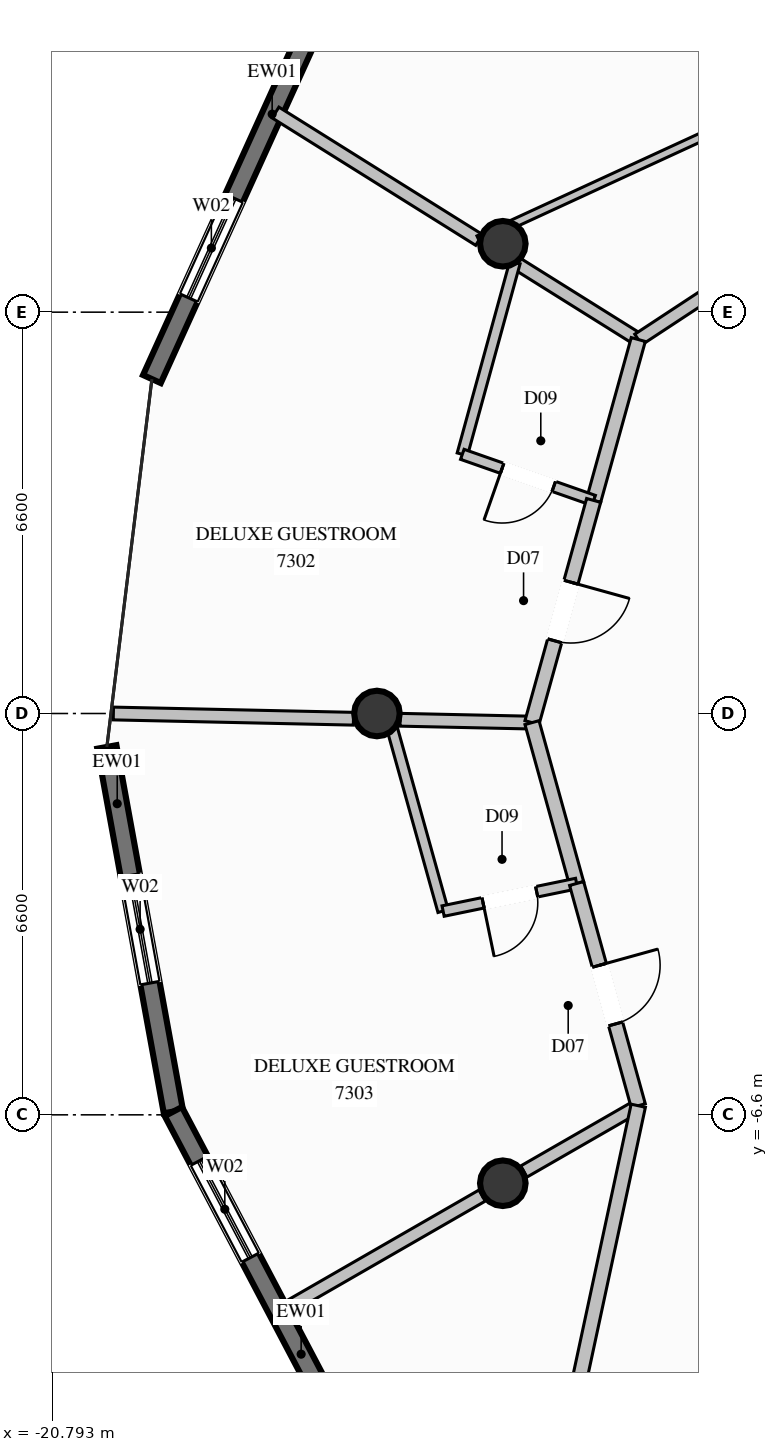
"""IFC4 building model, lengths in metres.
Left out: names, types, materials, properties, quantities, classifications, styles, units other than length and angle.
Written with IfcOpenShell. Run it as: python <this file> out.ifc"""

import sys

from ifc_helpers import new_model, si_unit, direction, frame, frame_2d, origin, origin_2d, place, context, subcontext, project, spatial, rectangle, circle, extrude, element, fill, save


model = new_model("IFC4")
c1 = context("Model", 3, precision=1e-05, world=origin(), true_north=direction((0.0, 1.0)))
c2 = subcontext(c1, "Body", "Model", "MODEL_VIEW")
j1 = project(units=[si_unit("LENGTHUNIT", "METRE"), si_unit("PLANEANGLEUNIT", "RADIAN")], contexts=[c1])
p1 = place(None, origin())
s1 = spatial("IfcSite", under=j1, at=p1, CompositionType="ELEMENT")
p2 = place(p1, origin())
s2 = spatial("IfcBuilding", under=s1, at=p2, CompositionType="ELEMENT")
p3 = place(p2, frame((0.0, 0.0, 274.4)))
s3 = spatial("IfcBuildingStorey", under=s2, at=p3, CompositionType="ELEMENT", Elevation=274.4)
for number, where, z_axis, x_axis in (
    (1, (-13.38, 7.725, 0.0), (0.0, 0.0, 1.0), (1.0, 0.0, 0.0)),
    (2, (-15.45, 0.0, 0.0), (0.0, 0.0, 1.0), (1.0, 0.0, 0.0)),
    (3, (-13.38, -7.725, 0.0), (0.0, 0.0, 1.0), (1.0, 0.0, 0.0)),
):
    element("IfcColumn", number, at=place(p3, frame(where, z_axis=z_axis, x_axis=x_axis)), inside=s3, PredefinedType="COLUMN", context=c2, shape_type="SweptSolid", body=[
        extrude(circle(Radius=0.375, at=origin_2d()), origin(), (0.0, 0.0, 1.0), 3.8),
    ])
p4 = place(p3, frame((-19.151, 5.5, 0.0), z_axis=(0.0, 0.0, 1.0), x_axis=(0.413325805639, 0.910583207836, 0.0)))
e4 = element("IfcWall", 4, at=p4, inside=s3, PredefinedType="SOLIDWALL", context=c2, shape_type="SweptSolid", body=[
    extrude(rectangle(XDim=6.053, YDim=0.32, at=frame_2d((3.027, 0.0))), origin(), (0.0, 0.0, 1.0), 3.57),
])
p5 = place(p4, frame((1.466, 0.0, 0.35)))
e5 = element("IfcOpeningElement", 5, at=p5, cuts=e4, PredefinedType="OPENING", context=c2, shape_type="SweptSolid", body=[
    extrude(rectangle(XDim=1.8, YDim=2.6, at=frame_2d((0.9, 1.3))), frame((0.0, 0.17, 0.0), z_axis=(0.0, -1.0, 0.0), x_axis=(1.0, 0.0, 0.0)), (0.0, 0.0, 1.0), 0.34),
])
p6 = place(p3, frame((-18.798, -6.546, 0.0), z_axis=(0.0, 0.0, 1.0), x_axis=(-0.179495230974, 0.983758843446, 0.0)))
e6 = element("IfcWall", 6, at=p6, inside=s3, PredefinedType="SOLIDWALL", context=c2, shape_type="SweptSolid", body=[
    extrude(rectangle(XDim=6.095, YDim=0.32, at=frame_2d((3.047, 0.0))), origin(), (0.0, 0.0, 1.0), 3.57),
])
p7 = place(p6, frame((2.147, 0.0, 0.35)))
e7 = element("IfcOpeningElement", 7, at=p7, cuts=e6, PredefinedType="OPENING", context=c2, shape_type="SweptSolid", body=[
    extrude(rectangle(XDim=1.8, YDim=2.6, at=frame_2d((0.9, 1.3))), frame((0.0, 0.17, 0.0), z_axis=(0.0, -1.0, 0.0), x_axis=(1.0, 0.0, 0.0)), (0.0, 0.0, 1.0), 0.34),
])
p8 = place(p3, frame((-15.977, -11.902, 0.0), z_axis=(0.0, 0.0, 1.0), x_axis=(-0.466004047649, 0.884782587744, 0.0)))
e8 = element("IfcWall", 8, at=p8, inside=s3, PredefinedType="SOLIDWALL", context=c2, shape_type="SweptSolid", body=[
    extrude(rectangle(XDim=6.054, YDim=0.32, at=frame_2d((3.027, 0.0))), origin(), (0.0, 0.0, 1.0), 3.57),
])
p9 = place(p8, frame((3.338, 0.0, 0.35)))
e9 = element("IfcOpeningElement", 9, at=p9, cuts=e8, PredefinedType="OPENING", context=c2, shape_type="SweptSolid", body=[
    extrude(rectangle(XDim=1.8, YDim=2.6, at=frame_2d((0.9, 1.3))), frame((0.0, 0.17, 0.0), z_axis=(0.0, -1.0, 0.0), x_axis=(1.0, 0.0, 0.0)), (0.0, 0.0, 1.0), 0.34),
])
p10 = place(p3, frame((-11.152, 6.15, 0.0), z_axis=(0.0, 0.0, 1.0), x_axis=(-0.847696016943, 0.530482292692, 0.0)))
e10 = element("IfcWall", 10, at=p10, inside=s3, PredefinedType="PARTITIONING", context=c2, shape_type="SweptSolid", body=[
    extrude(rectangle(XDim=2.361, YDim=0.21, at=frame_2d((1.18, 0.0))), origin(), (0.0, 0.0, 1.0), 3.086),
])
p11 = place(p3, frame((-13.77, 7.788, 0.0), z_axis=(0.0, 0.0, 1.0), x_axis=(-0.84770992622, 0.530460065404, 0.0)))
e11 = element("IfcWall", 11, at=p11, inside=s3, PredefinedType="PARTITIONING", context=c2, shape_type="SweptSolid", body=[
    extrude(rectangle(XDim=3.949, YDim=0.21, at=frame_2d((1.975, 0.0))), origin(), (0.0, 0.0, 1.0), 3.57),
])
p12 = place(p3, frame((-12.9, -0.15, 0.0), z_axis=(0.0, 0.0, 1.0), x_axis=(-0.999766597487, 0.021604410435, 0.0)))
e12 = element("IfcWall", 12, at=p12, inside=s3, PredefinedType="PARTITIONING", context=c2, shape_type="SweptSolid", body=[
    extrude(rectangle(XDim=2.17, YDim=0.21, at=frame_2d((1.085, 0.0))), origin(), (0.0, 0.0, 1.0), 3.57),
])
p13 = place(p3, frame((-15.836, -0.086, 0.0), z_axis=(0.0, 0.0, 1.0), x_axis=(-0.999763292221, 0.021756827132, 0.0)))
e13 = element("IfcWall", 13, at=p13, inside=s3, PredefinedType="PARTITIONING", context=c2, shape_type="SweptSolid", body=[
    extrude(rectangle(XDim=3.95, YDim=0.21, at=frame_2d((1.975, 0.0))), origin(), (0.0, 0.0, 1.0), 3.57),
])
p14 = place(p3, frame((-11.152, -6.45, 0.0), z_axis=(0.0, 0.0, 1.0), x_axis=(-0.866828578686, -0.498606272698, 0.0)))
e14 = element("IfcWall", 14, at=p14, inside=s3, PredefinedType="PARTITIONING", context=c2, shape_type="SweptSolid", body=[
    extrude(rectangle(XDim=2.172, YDim=0.21, at=frame_2d((1.086, 0.0))), origin(), (0.0, 0.0, 1.0), 3.086),
])
p15 = place(p3, frame((-13.719, -7.927, 0.0), z_axis=(0.0, 0.0, 1.0), x_axis=(-0.866706339444, -0.498818725759, 0.0)))
e15 = element("IfcWall", 15, at=p15, inside=s3, PredefinedType="PARTITIONING", context=c2, shape_type="SweptSolid", body=[
    extrude(rectangle(XDim=3.813, YDim=0.21, at=frame_2d((1.907, 0.0))), origin(), (0.0, 0.0, 1.0), 3.57),
])
p16 = place(p3, frame((-11.152, 6.15, 0.0), z_axis=(0.0, 0.0, 1.0), x_axis=(0.835549960432, 0.549414473437, 0.0)))
e16 = element("IfcWall", 16, at=p16, inside=s3, PredefinedType="PARTITIONING", context=c2, shape_type="SweptSolid", body=[
    extrude(rectangle(XDim=4.55, YDim=0.21, at=frame_2d((2.275, 0.0))), origin(), (0.0, 0.0, 1.0), 3.57),
])
p17 = place(p3, frame((-13.777, 7.793, 0.0), z_axis=(0.0, 0.0, 1.0), x_axis=(0.908271846509, 0.418380512021, 0.0)))
e17 = element("IfcWall", 17, at=p17, inside=s3, PredefinedType="PARTITIONING", context=c2, shape_type="SweptSolid", body=[
    extrude(rectangle(XDim=12.728, YDim=0.135, at=frame_2d((6.364, 0.0))), origin(), (0.0, 0.0, 1.0), 3.138),
])
p18 = place(p17, frame((5.889, 0.0, 0.0)))
e18 = element("IfcOpeningElement", 18, at=p18, cuts=e17, PredefinedType="OPENING", context=c2, shape_type="SweptSolid", body=[
    extrude(rectangle(XDim=0.95, YDim=2.1, at=frame_2d((0.475, 1.05))), frame((0.0, 0.078, 0.0), z_axis=(0.0, -1.0, 0.0), x_axis=(1.0, 0.0, 0.0)), (0.0, 0.0, 1.0), 0.155),
])
p19 = place(p3, frame((-11.152, 6.15, 0.0), z_axis=(0.0, 0.0, 1.0), x_axis=(-0.267267816759, -0.963622288101, 0.0)))
e19 = element("IfcWall", 19, at=p19, inside=s3, PredefinedType="PARTITIONING", context=c2, shape_type="SweptSolid", body=[
    extrude(rectangle(XDim=2.746, YDim=0.24, at=frame_2d((1.373, 0.0))), origin(), (0.0, 0.0, 1.0), 3.57),
])
p20 = place(p3, frame((-13.18, 7.419, 0.0), z_axis=(0.0, 0.0, 1.0), x_axis=(-0.264530676723, -0.96437727113, 0.0)))
e20 = element("IfcWall", 20, at=p20, inside=s3, PredefinedType="PLUMBINGWALL", context=c2, shape_type="SweptSolid", body=[
    extrude(rectangle(XDim=3.274, YDim=0.175, at=frame_2d((1.637, 0.0))), origin(), (0.0, 0.0, 1.0), 3.138),
])
p21 = place(p3, frame((-11.886, 3.504, 0.0), z_axis=(0.0, 0.0, 1.0), x_axis=(-0.943573673541, 0.331162682982, 0.0)))
e21 = element("IfcWall", 21, at=p21, inside=s3, PredefinedType="PLUMBINGWALL", context=c2, shape_type="SweptSolid", body=[
    extrude(rectangle(XDim=2.289, YDim=0.175, at=frame_2d((1.145, 0.0))), origin(), (0.0, 0.0, 1.0), 3.57),
])
p22 = place(p21, frame((0.695, 0.0, 0.0)))
e22 = element("IfcOpeningElement", 22, at=p22, cuts=e21, PredefinedType="OPENING", context=c2, shape_type="SweptSolid", body=[
    extrude(rectangle(XDim=0.9, YDim=2.1, at=frame_2d((0.45, 1.05))), frame((0.0, 0.098, 0.0), z_axis=(0.0, -1.0, 0.0), x_axis=(1.0, 0.0, 0.0)), (0.0, 0.0, 1.0), 0.195),
])
p23 = place(p3, frame((-11.886, 3.504, 0.0), z_axis=(0.0, 0.0, 1.0), x_axis=(-0.267391479621, -0.96358798074, 0.0)))
e23 = element("IfcWall", 23, at=p23, inside=s3, PredefinedType="PARTITIONING", context=c2, shape_type="SweptSolid", body=[
    extrude(rectangle(XDim=3.792, YDim=0.24, at=frame_2d((1.896, 0.0))), origin(), (0.0, 0.0, 1.0), 3.57),
])
p24 = place(p23, frame((1.396, 0.0, 0.0)))
e24 = element("IfcOpeningElement", 24, at=p24, cuts=e23, PredefinedType="OPENING", context=c2, shape_type="SweptSolid", body=[
    extrude(rectangle(XDim=1.0, YDim=2.2, at=frame_2d((0.5, 1.1))), frame((0.0, 0.13, 0.0), z_axis=(0.0, -1.0, 0.0), x_axis=(1.0, 0.0, 0.0)), (0.0, 0.0, 1.0), 0.26),
])
p25 = place(p3, frame((-12.9, -0.15, 0.0), z_axis=(0.0, 0.0, 1.0), x_axis=(0.267267816759, -0.963622288101, 0.0)))
e25 = element("IfcWall", 25, at=p25, inside=s3, PredefinedType="PARTITIONING", context=c2, shape_type="SweptSolid", body=[
    extrude(rectangle(XDim=2.746, YDim=0.24, at=frame_2d((1.373, 0.0))), origin(), (0.0, 0.0, 1.0), 3.57),
])
p26 = place(p3, frame((-15.241, -0.099, 0.0), z_axis=(0.0, 0.0, 1.0), x_axis=(0.268760309985, -0.963207088729, 0.0)))
e26 = element("IfcWall", 26, at=p26, inside=s3, PredefinedType="PLUMBINGWALL", context=c2, shape_type="SweptSolid", body=[
    extrude(rectangle(XDim=3.27, YDim=0.175, at=frame_2d((1.635, 0.0))), origin(), (0.0, 0.0, 1.0), 3.138),
])
p27 = place(p3, frame((-12.166, -2.796, 0.0), z_axis=(0.0, 0.0, 1.0), x_axis=(-0.979369033548, -0.202079925099, 0.0)))
e27 = element("IfcWall", 27, at=p27, inside=s3, PredefinedType="PLUMBINGWALL", context=c2, shape_type="SweptSolid", body=[
    extrude(rectangle(XDim=2.242, YDim=0.175, at=frame_2d((1.121, 0.0))), origin(), (0.0, 0.0, 1.0), 3.57),
])
p28 = place(p27, frame((0.671, 0.0, 0.0)))
e28 = element("IfcOpeningElement", 28, at=p28, cuts=e27, PredefinedType="OPENING", context=c2, shape_type="SweptSolid", body=[
    extrude(rectangle(XDim=0.9, YDim=2.1, at=frame_2d((0.45, 1.05))), frame((0.0, 0.098, 0.0), z_axis=(0.0, -1.0, 0.0), x_axis=(1.0, 0.0, 0.0)), (0.0, 0.0, 1.0), 0.195),
])
p29 = place(p3, frame((-12.166, -2.796, 0.0), z_axis=(0.0, 0.0, 1.0), x_axis=(0.267374891444, -0.963592583733, 0.0)))
e29 = element("IfcWall", 29, at=p29, inside=s3, PredefinedType="PARTITIONING", context=c2, shape_type="SweptSolid", body=[
    extrude(rectangle(XDim=3.792, YDim=0.24, at=frame_2d((1.896, 0.0))), origin(), (0.0, 0.0, 1.0), 3.57),
])
p30 = place(p29, frame((1.396, 0.0, 0.0)))
e30 = element("IfcOpeningElement", 30, at=p30, cuts=e29, PredefinedType="OPENING", context=c2, shape_type="SweptSolid", body=[
    extrude(rectangle(XDim=1.0, YDim=2.2, at=frame_2d((0.5, 1.1))), frame((0.0, 0.13, 0.0), z_axis=(0.0, -1.0, 0.0), x_axis=(1.0, 0.0, 0.0)), (0.0, 0.0, 1.0), 0.26),
])
p31 = place(p3, frame((-11.152, -6.45, 0.0), z_axis=(0.0, 0.0, 1.0), x_axis=(-0.209791126954, -0.977746226304, 0.0)))
e31 = element("IfcWall", 31, at=p31, inside=s3, PredefinedType="PARTITIONING", context=c2, shape_type="SweptSolid", body=[
    extrude(rectangle(XDim=5.472, YDim=0.24, at=frame_2d((2.736, 0.0))), origin(), (0.0, 0.0, 1.0), 3.57),
])
p32 = place(p5, origin())
e32 = element("IfcWindow", 32, at=p32, inside=s3, PartitioningType="SINGLE_PANEL", PredefinedType="WINDOW", context=c2, shape_type="SweptSolid", body=[
    extrude(rectangle(XDim=1.8, YDim=2.6, at=frame_2d((0.9, 1.3))), frame((0.0, 0.03, 0.0), z_axis=(0.0, -1.0, 0.0), x_axis=(1.0, 0.0, 0.0)), (0.0, 0.0, 1.0), 0.06),
])
fill(e5, e32)
p33 = place(p7, origin())
e33 = element("IfcWindow", 33, at=p33, inside=s3, PartitioningType="SINGLE_PANEL", PredefinedType="WINDOW", context=c2, shape_type="SweptSolid", body=[
    extrude(rectangle(XDim=1.8, YDim=2.6, at=frame_2d((0.9, 1.3))), frame((0.0, 0.03, 0.0), z_axis=(0.0, -1.0, 0.0), x_axis=(1.0, 0.0, 0.0)), (0.0, 0.0, 1.0), 0.06),
])
fill(e7, e33)
p34 = place(p9, origin())
e34 = element("IfcWindow", 34, at=p34, inside=s3, PartitioningType="SINGLE_PANEL", PredefinedType="WINDOW", context=c2, shape_type="SweptSolid", body=[
    extrude(rectangle(XDim=1.8, YDim=2.6, at=frame_2d((0.9, 1.3))), frame((0.0, 0.03, 0.0), z_axis=(0.0, -1.0, 0.0), x_axis=(1.0, 0.0, 0.0)), (0.0, 0.0, 1.0), 0.06),
])
fill(e9, e34)
p35 = place(p22, origin())
e35 = element("IfcDoor", 35, at=p35, inside=s3, OperationType="SINGLE_SWING_RIGHT", PredefinedType="DOOR", context=c2, shape_type="SweptSolid", body=[
    extrude(rectangle(XDim=0.9, YDim=2.1, at=frame_2d((0.45, 1.05))), frame((0.0, 0.025, 0.0), z_axis=(0.0, -1.0, 0.0), x_axis=(1.0, 0.0, 0.0)), (0.0, 0.0, 1.0), 0.05),
])
fill(e22, e35)
p36 = place(p24, origin())
e36 = element("IfcDoor", 36, at=p36, inside=s3, OperationType="SINGLE_SWING_LEFT", PredefinedType="DOOR", context=c2, shape_type="SweptSolid", body=[
    extrude(rectangle(XDim=1.0, YDim=2.2, at=frame_2d((0.5, 1.1))), frame((0.0, 0.025, 0.0), z_axis=(0.0, -1.0, 0.0), x_axis=(1.0, 0.0, 0.0)), (0.0, 0.0, 1.0), 0.05),
])
fill(e24, e36)
p37 = place(p28, origin())
e37 = element("IfcDoor", 37, at=p37, inside=s3, OperationType="SINGLE_SWING_RIGHT", PredefinedType="DOOR", context=c2, shape_type="SweptSolid", body=[
    extrude(rectangle(XDim=0.9, YDim=2.1, at=frame_2d((0.45, 1.05))), frame((0.0, 0.025, 0.0), z_axis=(0.0, -1.0, 0.0), x_axis=(1.0, 0.0, 0.0)), (0.0, 0.0, 1.0), 0.05),
])
fill(e28, e37)
p38 = place(p30, origin())
e38 = element("IfcDoor", 38, at=p38, inside=s3, OperationType="SINGLE_SWING_LEFT", PredefinedType="DOOR", context=c2, shape_type="SweptSolid", body=[
    extrude(rectangle(XDim=1.0, YDim=2.2, at=frame_2d((0.5, 1.1))), frame((0.0, 0.025, 0.0), z_axis=(0.0, -1.0, 0.0), x_axis=(1.0, 0.0, 0.0)), (0.0, 0.0, 1.0), 0.05),
])
fill(e30, e38)
save(model, sys.argv[1])
